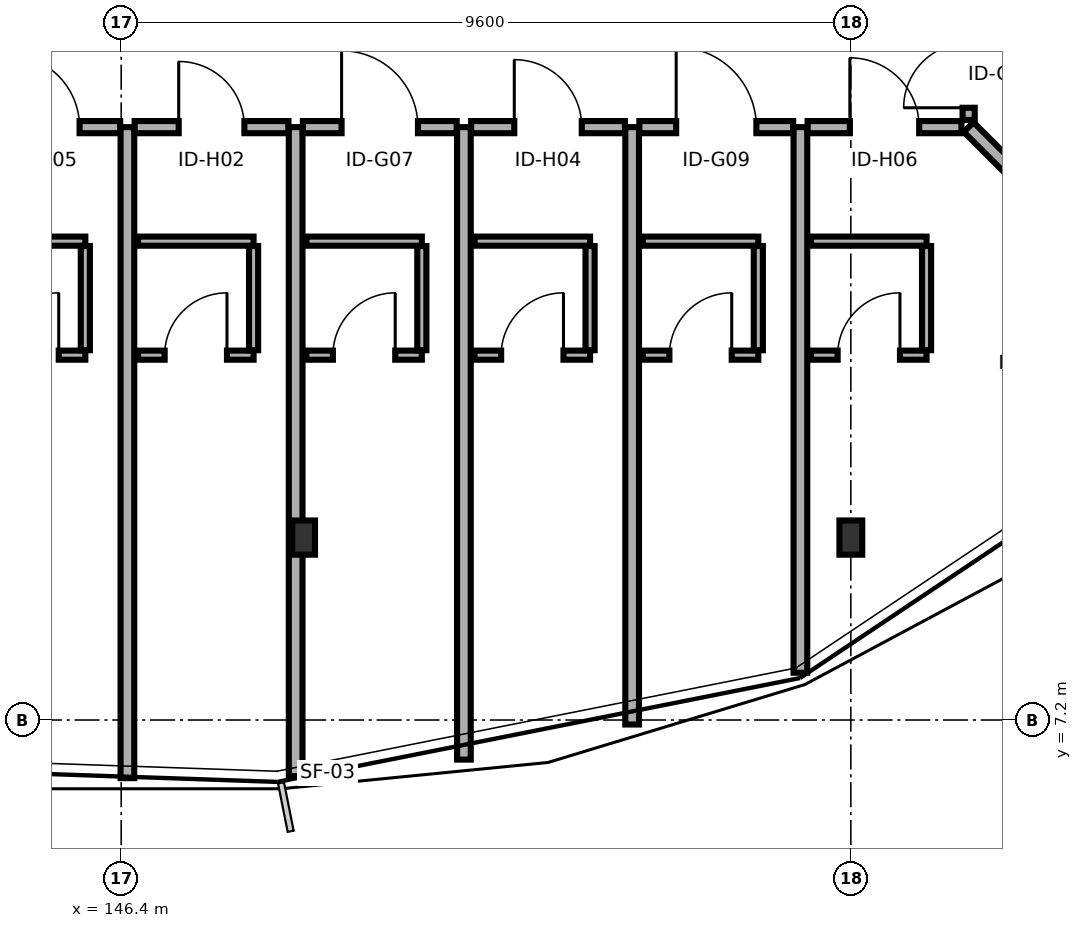
"""IFC4 building model, lengths in metres.
Left out: names, types, materials, properties, quantities, classifications, styles, units other than length and angle.
Written with IfcOpenShell. Run it as: python <this file> out.ifc"""

import sys

from ifc_helpers import new_model, si_unit, direction, frame, frame_2d, origin, origin_2d, place, context, subcontext, project, spatial, rectangle, i_section, extrude, element, fill, save


model = new_model("IFC4")
c1 = context("Model", 3, precision=1e-05, world=origin(), true_north=direction((0.0, 1.0)))
c2 = subcontext(c1, "Body", "Model", "MODEL_VIEW")
j1 = project(units=[si_unit("LENGTHUNIT", "METRE"), si_unit("PLANEANGLEUNIT", "RADIAN")], contexts=[c1])
p1 = place(None, origin())
s1 = spatial("IfcSite", under=j1, at=p1, CompositionType="ELEMENT")
p2 = place(p1, origin())
s2 = spatial("IfcBuilding", under=s1, at=p2, CompositionType="ELEMENT")
p3 = place(p2, frame((0.0, 0.0, 28.3)))
s3 = spatial("IfcBuildingStorey", under=s2, at=p3, CompositionType="ELEMENT", Elevation=28.3)
for number, where, z_axis, x_axis in (
    (1, (148.8, 9.6, 0.0), (0.0, 0.0, 1.0), (1.0, 0.0, 0.0)),
    (2, (156.0, 9.6, 0.0), (0.0, 0.0, 1.0), (1.0, 0.0, 0.0)),
):
    element("IfcColumn", number, at=place(p3, frame(where, z_axis=z_axis, x_axis=x_axis)), inside=s3, PredefinedType="COLUMN", context=c2, shape_type="SweptSolid", body=[
        extrude(i_section(OverallWidth=0.3, OverallDepth=0.45, WebThickness=0.014, FlangeThickness=0.026, FilletRadius=0.027, at=origin_2d()), origin(), (0.0, 0.0, 1.0), 3.4),
    ])
p4 = place(p3, frame((144.363, 15.0, 0.0), z_axis=(0.0, 0.0, 1.0), x_axis=(1.0, 0.0, 0.0)))
e3 = element("IfcWall", 3, at=p4, inside=s3, PredefinedType="PARTITIONING", context=c2, shape_type="SweptSolid", body=[
    extrude(rectangle(XDim=2.023, YDim=0.16, at=frame_2d((1.012, 0.0))), origin(), (0.0, 0.0, 1.0), 3.175),
])
p5 = place(p4, frame((0.534, 0.0, 0.0)))
e4 = element("IfcOpeningElement", 4, at=p5, cuts=e3, PredefinedType="OPENING", context=c2, shape_type="SweptSolid", body=[
    extrude(rectangle(XDim=0.955, YDim=2.05, at=frame_2d((0.478, 1.025))), frame((0.0, 0.09, 0.0), z_axis=(0.0, -1.0, 0.0), x_axis=(1.0, 0.0, 0.0)), (0.0, 0.0, 1.0), 0.18),
])
p6 = place(p3, frame((144.408, 12.0, 0.0), z_axis=(0.0, 0.0, 1.0), x_axis=(1.0, 0.0, 0.0)))
e5 = element("IfcWall", 5, at=p6, inside=s3, PredefinedType="PARTITIONING", context=c2, shape_type="SweptSolid", body=[
    extrude(rectangle(XDim=1.52, YDim=0.12, at=frame_2d((0.76, 0.0))), origin(), (0.0, 0.0, 1.0), 3.175),
])
p7 = place(p6, frame((0.35, 0.0, 0.0)))
e6 = element("IfcOpeningElement", 6, at=p7, cuts=e5, PredefinedType="OPENING", context=c2, shape_type="SweptSolid", body=[
    extrude(rectangle(XDim=0.82, YDim=2.08, at=frame_2d((0.41, 1.04))), frame((0.0, 0.07, 0.0), z_axis=(0.0, -1.0, 0.0), x_axis=(1.0, 0.0, 0.0)), (0.0, 0.0, 1.0), 0.14),
])
p8 = place(p3, frame((144.408, 13.5, 0.0), z_axis=(0.0, 0.0, 1.0), x_axis=(1.0, 0.0, 0.0)))
e7 = element("IfcWall", 7, at=p8, inside=s3, PredefinedType="PARTITIONING", context=c2, shape_type="SweptSolid", body=[
    extrude(rectangle(XDim=1.52, YDim=0.12, at=frame_2d((0.76, 0.0))), origin(), (0.0, 0.0, 1.0), 3.175),
])
p9 = place(p3, frame((145.928, 12.065, 0.0), z_axis=(0.0, 0.0, 1.0), x_axis=(0.0, 1.0, 0.0)))
e8 = element("IfcWall", 8, at=p9, inside=s3, PredefinedType="PARTITIONING", context=c2, shape_type="SweptSolid", body=[
    extrude(rectangle(XDim=1.37, YDim=0.12, at=frame_2d((0.685, 0.0))), origin(), (0.0, 0.0, 1.0), 3.175),
])
p10 = place(p3, frame((146.482, 6.436, 0.0), z_axis=(0.0, 0.0, 1.0), x_axis=(0.0, 1.0, 0.0)))
e9 = element("IfcWall", 9, at=p10, inside=s3, PredefinedType="PARTITIONING", context=c2, shape_type="SweptSolid", body=[
    extrude(rectangle(XDim=8.564, YDim=0.18, at=frame_2d((4.282, 0.0))), origin(), (0.0, 0.0, 1.0), 2.66),
])
p11 = place(p3, frame((146.577, 15.0, 0.0), z_axis=(0.0, 0.0, 1.0), x_axis=(1.0, 0.0, 0.0)))
e10 = element("IfcWall", 10, at=p11, inside=s3, PredefinedType="PARTITIONING", context=c2, shape_type="SweptSolid", body=[
    extrude(rectangle(XDim=2.024, YDim=0.16, at=frame_2d((1.012, 0.0))), origin(), (0.0, 0.0, 1.0), 3.175),
])
p12 = place(p11, frame((0.58, 0.0, 0.0)))
e11 = element("IfcOpeningElement", 11, at=p12, cuts=e10, PredefinedType="OPENING", context=c2, shape_type="SweptSolid", body=[
    extrude(rectangle(XDim=0.864, YDim=2.13, at=frame_2d((0.432, 1.065))), frame((0.0, 0.09, 0.0), z_axis=(0.0, -1.0, 0.0), x_axis=(1.0, 0.0, 0.0)), (0.0, 0.0, 1.0), 0.18),
])
p13 = place(p3, frame((146.622, 12.0, 0.0), z_axis=(0.0, 0.0, 1.0), x_axis=(1.0, 0.0, 0.0)))
e12 = element("IfcWall", 12, at=p13, inside=s3, PredefinedType="PARTITIONING", context=c2, shape_type="SweptSolid", body=[
    extrude(rectangle(XDim=1.52, YDim=0.12, at=frame_2d((0.76, 0.0))), origin(), (0.0, 0.0, 1.0), 3.175),
])
p14 = place(p13, frame((0.35, 0.0, 0.0)))
e13 = element("IfcOpeningElement", 13, at=p14, cuts=e12, PredefinedType="OPENING", context=c2, shape_type="SweptSolid", body=[
    extrude(rectangle(XDim=0.82, YDim=2.08, at=frame_2d((0.41, 1.04))), frame((0.0, 0.07, 0.0), z_axis=(0.0, -1.0, 0.0), x_axis=(1.0, 0.0, 0.0)), (0.0, 0.0, 1.0), 0.14),
])
p15 = place(p3, frame((146.622, 13.5, 0.0), z_axis=(0.0, 0.0, 1.0), x_axis=(1.0, 0.0, 0.0)))
e14 = element("IfcWall", 14, at=p15, inside=s3, PredefinedType="PARTITIONING", context=c2, shape_type="SweptSolid", body=[
    extrude(rectangle(XDim=1.52, YDim=0.12, at=frame_2d((0.76, 0.0))), origin(), (0.0, 0.0, 1.0), 3.175),
])
p16 = place(p3, frame((148.142, 12.065, 0.0), z_axis=(0.0, 0.0, 1.0), x_axis=(0.0, 1.0, 0.0)))
e15 = element("IfcWall", 15, at=p16, inside=s3, PredefinedType="PARTITIONING", context=c2, shape_type="SweptSolid", body=[
    extrude(rectangle(XDim=1.37, YDim=0.12, at=frame_2d((0.685, 0.0))), origin(), (0.0, 0.0, 1.0), 3.175),
])
p17 = place(p3, frame((148.696, 6.461, 0.0), z_axis=(0.0, 0.0, 1.0), x_axis=(0.0, 1.0, 0.0)))
e16 = element("IfcWall", 16, at=p17, inside=s3, PredefinedType="PARTITIONING", context=c2, shape_type="SweptSolid", body=[
    extrude(rectangle(XDim=8.539, YDim=0.18, at=frame_2d((4.27, 0.0))), origin(), (0.0, 0.0, 1.0), 2.66),
])
p18 = place(p3, frame((148.791, 15.0, 0.0), z_axis=(0.0, 0.0, 1.0), x_axis=(1.0, 0.0, 0.0)))
e17 = element("IfcWall", 17, at=p18, inside=s3, PredefinedType="PARTITIONING", context=c2, shape_type="SweptSolid", body=[
    extrude(rectangle(XDim=2.024, YDim=0.16, at=frame_2d((1.012, 0.0))), origin(), (0.0, 0.0, 1.0), 2.71),
])
p19 = place(p18, frame((0.509, 0.0, 0.0)))
e18 = element("IfcOpeningElement", 18, at=p19, cuts=e17, PredefinedType="OPENING", context=c2, shape_type="SweptSolid", body=[
    extrude(rectangle(XDim=1.005, YDim=2.05, at=frame_2d((0.502, 1.025))), frame((0.0, 0.09, 0.0), z_axis=(0.0, -1.0, 0.0), x_axis=(1.0, 0.0, 0.0)), (0.0, 0.0, 1.0), 0.18),
])
p20 = place(p3, frame((148.835, 12.0, 0.0), z_axis=(0.0, 0.0, 1.0), x_axis=(1.0, 0.0, 0.0)))
e19 = element("IfcWall", 19, at=p20, inside=s3, PredefinedType="PARTITIONING", context=c2, shape_type="SweptSolid", body=[
    extrude(rectangle(XDim=1.52, YDim=0.12, at=frame_2d((0.76, 0.0))), origin(), (0.0, 0.0, 1.0), 2.71),
])
p21 = place(p20, frame((0.35, 0.0, 0.0)))
e20 = element("IfcOpeningElement", 20, at=p21, cuts=e19, PredefinedType="OPENING", context=c2, shape_type="SweptSolid", body=[
    extrude(rectangle(XDim=0.82, YDim=2.08, at=frame_2d((0.41, 1.04))), frame((0.0, 0.07, 0.0), z_axis=(0.0, -1.0, 0.0), x_axis=(1.0, 0.0, 0.0)), (0.0, 0.0, 1.0), 0.14),
])
p22 = place(p3, frame((148.835, 13.5, 0.0), z_axis=(0.0, 0.0, 1.0), x_axis=(1.0, 0.0, 0.0)))
e21 = element("IfcWall", 21, at=p22, inside=s3, PredefinedType="PARTITIONING", context=c2, shape_type="SweptSolid", body=[
    extrude(rectangle(XDim=1.52, YDim=0.12, at=frame_2d((0.76, 0.0))), origin(), (0.0, 0.0, 1.0), 2.71),
])
p23 = place(p3, frame((150.355, 12.065, 0.0), z_axis=(0.0, 0.0, 1.0), x_axis=(0.0, 1.0, 0.0)))
e22 = element("IfcWall", 22, at=p23, inside=s3, PredefinedType="PARTITIONING", context=c2, shape_type="SweptSolid", body=[
    extrude(rectangle(XDim=1.37, YDim=0.12, at=frame_2d((0.685, 0.0))), origin(), (0.0, 0.0, 1.0), 3.175),
])
p24 = place(p3, frame((150.909, 6.679, 0.0), z_axis=(0.0, 0.0, 1.0), x_axis=(0.0, 1.0, 0.0)))
e23 = element("IfcWall", 23, at=p24, inside=s3, PredefinedType="PARTITIONING", context=c2, shape_type="SweptSolid", body=[
    extrude(rectangle(XDim=8.321, YDim=0.18, at=frame_2d((4.16, 0.0))), origin(), (0.0, 0.0, 1.0), 2.66),
])
p25 = place(p3, frame((151.004, 15.0, 0.0), z_axis=(0.0, 0.0, 1.0), x_axis=(1.0, 0.0, 0.0)))
e24 = element("IfcWall", 24, at=p25, inside=s3, PredefinedType="PARTITIONING", context=c2, shape_type="SweptSolid", body=[
    extrude(rectangle(XDim=2.023, YDim=0.16, at=frame_2d((1.012, 0.0))), origin(), (0.0, 0.0, 1.0), 3.175),
])
p26 = place(p25, frame((0.568, 0.0, 0.0)))
e25 = element("IfcOpeningElement", 25, at=p26, cuts=e24, PredefinedType="OPENING", context=c2, shape_type="SweptSolid", body=[
    extrude(rectangle(XDim=0.888, YDim=2.07, at=frame_2d((0.444, 1.035))), frame((0.0, 0.09, 0.0), z_axis=(0.0, -1.0, 0.0), x_axis=(1.0, 0.0, 0.0)), (0.0, 0.0, 1.0), 0.18),
])
p27 = place(p3, frame((151.049, 12.0, 0.0), z_axis=(0.0, 0.0, 1.0), x_axis=(1.0, 0.0, 0.0)))
e26 = element("IfcWall", 26, at=p27, inside=s3, PredefinedType="PARTITIONING", context=c2, shape_type="SweptSolid", body=[
    extrude(rectangle(XDim=1.52, YDim=0.12, at=frame_2d((0.76, 0.0))), origin(), (0.0, 0.0, 1.0), 3.175),
])
p28 = place(p27, frame((0.35, 0.0, 0.0)))
e27 = element("IfcOpeningElement", 27, at=p28, cuts=e26, PredefinedType="OPENING", context=c2, shape_type="SweptSolid", body=[
    extrude(rectangle(XDim=0.82, YDim=2.08, at=frame_2d((0.41, 1.04))), frame((0.0, 0.07, 0.0), z_axis=(0.0, -1.0, 0.0), x_axis=(1.0, 0.0, 0.0)), (0.0, 0.0, 1.0), 0.14),
])
p29 = place(p3, frame((151.049, 13.5, 0.0), z_axis=(0.0, 0.0, 1.0), x_axis=(1.0, 0.0, 0.0)))
e28 = element("IfcWall", 28, at=p29, inside=s3, PredefinedType="PARTITIONING", context=c2, shape_type="SweptSolid", body=[
    extrude(rectangle(XDim=1.52, YDim=0.12, at=frame_2d((0.76, 0.0))), origin(), (0.0, 0.0, 1.0), 3.175),
])
p30 = place(p3, frame((152.569, 12.065, 0.0), z_axis=(0.0, 0.0, 1.0), x_axis=(0.0, 1.0, 0.0)))
e29 = element("IfcWall", 29, at=p30, inside=s3, PredefinedType="PARTITIONING", context=c2, shape_type="SweptSolid", body=[
    extrude(rectangle(XDim=1.37, YDim=0.12, at=frame_2d((0.685, 0.0))), origin(), (0.0, 0.0, 1.0), 3.175),
])
p31 = place(p3, frame((153.123, 7.141, 0.0), z_axis=(0.0, 0.0, 1.0), x_axis=(0.0, 1.0, 0.0)))
e30 = element("IfcWall", 30, at=p31, inside=s3, PredefinedType="PARTITIONING", context=c2, shape_type="SweptSolid", body=[
    extrude(rectangle(XDim=7.859, YDim=0.18, at=frame_2d((3.929, 0.0))), origin(), (0.0, 0.0, 1.0), 2.66),
])
p32 = place(p3, frame((153.218, 15.0, 0.0), z_axis=(0.0, 0.0, 1.0), x_axis=(1.0, 0.0, 0.0)))
e31 = element("IfcWall", 31, at=p32, inside=s3, PredefinedType="PARTITIONING", context=c2, shape_type="SweptSolid", body=[
    extrude(rectangle(XDim=2.024, YDim=0.16, at=frame_2d((1.012, 0.0))), origin(), (0.0, 0.0, 1.0), 3.175),
])
p33 = place(p32, frame((0.484, 0.0, 0.0)))
e32 = element("IfcOpeningElement", 32, at=p33, cuts=e31, PredefinedType="OPENING", context=c2, shape_type="SweptSolid", body=[
    extrude(rectangle(XDim=1.055, YDim=2.05, at=frame_2d((0.527, 1.025))), frame((0.0, 0.09, 0.0), z_axis=(0.0, -1.0, 0.0), x_axis=(1.0, 0.0, 0.0)), (0.0, 0.0, 1.0), 0.18),
])
p34 = place(p3, frame((153.263, 12.0, 0.0), z_axis=(0.0, 0.0, 1.0), x_axis=(1.0, 0.0, 0.0)))
e33 = element("IfcWall", 33, at=p34, inside=s3, PredefinedType="PARTITIONING", context=c2, shape_type="SweptSolid", body=[
    extrude(rectangle(XDim=1.52, YDim=0.12, at=frame_2d((0.76, 0.0))), origin(), (0.0, 0.0, 1.0), 3.175),
])
p35 = place(p34, frame((0.35, 0.0, 0.0)))
e34 = element("IfcOpeningElement", 34, at=p35, cuts=e33, PredefinedType="OPENING", context=c2, shape_type="SweptSolid", body=[
    extrude(rectangle(XDim=0.82, YDim=2.08, at=frame_2d((0.41, 1.04))), frame((0.0, 0.07, 0.0), z_axis=(0.0, -1.0, 0.0), x_axis=(1.0, 0.0, 0.0)), (0.0, 0.0, 1.0), 0.14),
])
p36 = place(p3, frame((153.263, 13.5, 0.0), z_axis=(0.0, 0.0, 1.0), x_axis=(1.0, 0.0, 0.0)))
e35 = element("IfcWall", 35, at=p36, inside=s3, PredefinedType="PARTITIONING", context=c2, shape_type="SweptSolid", body=[
    extrude(rectangle(XDim=1.52, YDim=0.12, at=frame_2d((0.76, 0.0))), origin(), (0.0, 0.0, 1.0), 3.175),
])
p37 = place(p3, frame((154.783, 12.065, 0.0), z_axis=(0.0, 0.0, 1.0), x_axis=(0.0, 1.0, 0.0)))
e36 = element("IfcWall", 36, at=p37, inside=s3, PredefinedType="PARTITIONING", context=c2, shape_type="SweptSolid", body=[
    extrude(rectangle(XDim=1.37, YDim=0.12, at=frame_2d((0.685, 0.0))), origin(), (0.0, 0.0, 1.0), 3.175),
])
p38 = place(p3, frame((155.336, 7.822, 0.0), z_axis=(0.0, 0.0, 1.0), x_axis=(0.0, 1.0, 0.0)))
e37 = element("IfcWall", 37, at=p38, inside=s3, PredefinedType="PARTITIONING", context=c2, shape_type="SweptSolid", body=[
    extrude(rectangle(XDim=7.178, YDim=0.18, at=frame_2d((3.589, 0.0))), origin(), (0.0, 0.0, 1.0), 2.66),
])
p39 = place(p3, frame((155.431, 15.0, 0.0), z_axis=(0.0, 0.0, 1.0), x_axis=(1.0, 0.0, 0.0)))
e38 = element("IfcWall", 38, at=p39, inside=s3, PredefinedType="PARTITIONING", context=c2, shape_type="SweptSolid", body=[
    extrude(rectangle(XDim=2.024, YDim=0.16, at=frame_2d((1.012, 0.0))), origin(), (0.0, 0.0, 1.0), 2.71),
])
p40 = place(p39, frame((0.556, 0.0, 0.0)))
e39 = element("IfcOpeningElement", 39, at=p40, cuts=e38, PredefinedType="OPENING", context=c2, shape_type="SweptSolid", body=[
    extrude(rectangle(XDim=0.912, YDim=2.13, at=frame_2d((0.456, 1.065))), frame((0.0, 0.09, 0.0), z_axis=(0.0, -1.0, 0.0), x_axis=(1.0, 0.0, 0.0)), (0.0, 0.0, 1.0), 0.18),
])
p41 = place(p3, frame((155.476, 12.0, 0.0), z_axis=(0.0, 0.0, 1.0), x_axis=(1.0, 0.0, 0.0)))
e40 = element("IfcWall", 40, at=p41, inside=s3, PredefinedType="PARTITIONING", context=c2, shape_type="SweptSolid", body=[
    extrude(rectangle(XDim=1.52, YDim=0.12, at=frame_2d((0.76, 0.0))), origin(), (0.0, 0.0, 1.0), 2.71),
])
p42 = place(p41, frame((0.35, 0.0, 0.0)))
e41 = element("IfcOpeningElement", 41, at=p42, cuts=e40, PredefinedType="OPENING", context=c2, shape_type="SweptSolid", body=[
    extrude(rectangle(XDim=0.82, YDim=2.08, at=frame_2d((0.41, 1.04))), frame((0.0, 0.07, 0.0), z_axis=(0.0, -1.0, 0.0), x_axis=(1.0, 0.0, 0.0)), (0.0, 0.0, 1.0), 0.14),
])
p43 = place(p3, frame((155.476, 13.5, 0.0), z_axis=(0.0, 0.0, 1.0), x_axis=(1.0, 0.0, 0.0)))
e42 = element("IfcWall", 42, at=p43, inside=s3, PredefinedType="PARTITIONING", context=c2, shape_type="SweptSolid", body=[
    extrude(rectangle(XDim=1.52, YDim=0.12, at=frame_2d((0.76, 0.0))), origin(), (0.0, 0.0, 1.0), 2.71),
])
p44 = place(p3, frame((156.996, 12.065, 0.0), z_axis=(0.0, 0.0, 1.0), x_axis=(0.0, 1.0, 0.0)))
e43 = element("IfcWall", 43, at=p44, inside=s3, PredefinedType="PARTITIONING", context=c2, shape_type="SweptSolid", body=[
    extrude(rectangle(XDim=1.37, YDim=0.12, at=frame_2d((0.685, 0.0))), origin(), (0.0, 0.0, 1.0), 3.175),
])
p45 = place(p3, frame((157.55, 15.0, 0.0), z_axis=(0.0, 0.0, 1.0), x_axis=(0.707106781187, -0.707106781187, 0.0)))
e44 = element("IfcWall", 44, at=p45, inside=s3, PredefinedType="PARTITIONING", context=c2, shape_type="SweptSolid", body=[
    extrude(rectangle(XDim=4.844, YDim=0.18, at=frame_2d((2.422, 0.0))), origin(), (0.0, 0.0, 1.0), 2.66),
])
p46 = place(p3, frame((157.55, 15.095, 0.0), z_axis=(0.0, 0.0, 1.0), x_axis=(0.0, 1.0, 0.0)))
e45 = element("IfcWall", 45, at=p46, inside=s3, PredefinedType="PARTITIONING", context=c2, shape_type="SweptSolid", body=[
    extrude(rectangle(XDim=2.101, YDim=0.16, at=frame_2d((1.05, 0.0))), origin(), (0.0, 0.0, 1.0), 2.71),
])
p47 = place(p46, frame((0.16, 0.0, 0.0)))
e46 = element("IfcOpeningElement", 46, at=p47, cuts=e45, PredefinedType="OPENING", context=c2, shape_type="SweptSolid", body=[
    extrude(rectangle(XDim=0.855, YDim=2.05, at=frame_2d((0.427, 1.025))), frame((0.0, 0.09, 0.0), z_axis=(0.0, -1.0, 0.0), x_axis=(1.0, 0.0, 0.0)), (0.0, 0.0, 1.0), 0.18),
])
p48 = place(p5, origin())
e47 = element("IfcDoor", 47, at=p48, inside=s3, OperationType="SINGLE_SWING_LEFT", PredefinedType="DOOR", context=c2, shape_type="SweptSolid", body=[
    extrude(rectangle(XDim=0.955, YDim=2.05, at=frame_2d((0.478, 1.025))), frame((0.0, 0.025, 0.0), z_axis=(0.0, -1.0, 0.0), x_axis=(1.0, 0.0, 0.0)), (0.0, 0.0, 1.0), 0.05),
])
fill(e4, e47)
p49 = place(p7, origin())
e48 = element("IfcDoor", 48, at=p49, inside=s3, OperationType="SINGLE_SWING_RIGHT", PredefinedType="DOOR", context=c2, shape_type="SweptSolid", body=[
    extrude(rectangle(XDim=0.82, YDim=2.08, at=frame_2d((0.41, 1.04))), frame((0.0, 0.025, 0.0), z_axis=(0.0, -1.0, 0.0), x_axis=(1.0, 0.0, 0.0)), (0.0, 0.0, 1.0), 0.05),
])
fill(e6, e48)
p50 = place(p12, origin())
e49 = element("IfcDoor", 49, at=p50, inside=s3, OperationType="SINGLE_SWING_LEFT", PredefinedType="DOOR", context=c2, shape_type="SweptSolid", body=[
    extrude(rectangle(XDim=0.864, YDim=2.13, at=frame_2d((0.432, 1.065))), frame((0.0, 0.025, 0.0), z_axis=(0.0, -1.0, 0.0), x_axis=(1.0, 0.0, 0.0)), (0.0, 0.0, 1.0), 0.05),
])
fill(e11, e49)
p51 = place(p14, origin())
e50 = element("IfcDoor", 50, at=p51, inside=s3, OperationType="SINGLE_SWING_RIGHT", PredefinedType="DOOR", context=c2, shape_type="SweptSolid", body=[
    extrude(rectangle(XDim=0.82, YDim=2.08, at=frame_2d((0.41, 1.04))), frame((0.0, 0.025, 0.0), z_axis=(0.0, -1.0, 0.0), x_axis=(1.0, 0.0, 0.0)), (0.0, 0.0, 1.0), 0.05),
])
fill(e13, e50)
p52 = place(p19, origin())
e51 = element("IfcDoor", 51, at=p52, inside=s3, OperationType="SINGLE_SWING_LEFT", PredefinedType="DOOR", context=c2, shape_type="SweptSolid", body=[
    extrude(rectangle(XDim=1.005, YDim=2.05, at=frame_2d((0.502, 1.025))), frame((0.0, 0.025, 0.0), z_axis=(0.0, -1.0, 0.0), x_axis=(1.0, 0.0, 0.0)), (0.0, 0.0, 1.0), 0.05),
])
fill(e18, e51)
p53 = place(p21, origin())
e52 = element("IfcDoor", 52, at=p53, inside=s3, OperationType="SINGLE_SWING_RIGHT", PredefinedType="DOOR", context=c2, shape_type="SweptSolid", body=[
    extrude(rectangle(XDim=0.82, YDim=2.08, at=frame_2d((0.41, 1.04))), frame((0.0, 0.025, 0.0), z_axis=(0.0, -1.0, 0.0), x_axis=(1.0, 0.0, 0.0)), (0.0, 0.0, 1.0), 0.05),
])
fill(e20, e52)
p54 = place(p26, origin())
e53 = element("IfcDoor", 53, at=p54, inside=s3, OperationType="SINGLE_SWING_LEFT", PredefinedType="DOOR", context=c2, shape_type="SweptSolid", body=[
    extrude(rectangle(XDim=0.888, YDim=2.07, at=frame_2d((0.444, 1.035))), frame((0.0, 0.025, 0.0), z_axis=(0.0, -1.0, 0.0), x_axis=(1.0, 0.0, 0.0)), (0.0, 0.0, 1.0), 0.05),
])
fill(e25, e53)
p55 = place(p28, origin())
e54 = element("IfcDoor", 54, at=p55, inside=s3, OperationType="SINGLE_SWING_RIGHT", PredefinedType="DOOR", context=c2, shape_type="SweptSolid", body=[
    extrude(rectangle(XDim=0.82, YDim=2.08, at=frame_2d((0.41, 1.04))), frame((0.0, 0.025, 0.0), z_axis=(0.0, -1.0, 0.0), x_axis=(1.0, 0.0, 0.0)), (0.0, 0.0, 1.0), 0.05),
])
fill(e27, e54)
p56 = place(p33, origin())
e55 = element("IfcDoor", 55, at=p56, inside=s3, OperationType="SINGLE_SWING_LEFT", PredefinedType="DOOR", context=c2, shape_type="SweptSolid", body=[
    extrude(rectangle(XDim=1.055, YDim=2.05, at=frame_2d((0.527, 1.025))), frame((0.0, 0.025, 0.0), z_axis=(0.0, -1.0, 0.0), x_axis=(1.0, 0.0, 0.0)), (0.0, 0.0, 1.0), 0.05),
])
fill(e32, e55)
p57 = place(p35, origin())
e56 = element("IfcDoor", 56, at=p57, inside=s3, OperationType="SINGLE_SWING_RIGHT", PredefinedType="DOOR", context=c2, shape_type="SweptSolid", body=[
    extrude(rectangle(XDim=0.82, YDim=2.08, at=frame_2d((0.41, 1.04))), frame((0.0, 0.025, 0.0), z_axis=(0.0, -1.0, 0.0), x_axis=(1.0, 0.0, 0.0)), (0.0, 0.0, 1.0), 0.05),
])
fill(e34, e56)
p58 = place(p40, origin())
e57 = element("IfcDoor", 57, at=p58, inside=s3, OperationType="SINGLE_SWING_LEFT", PredefinedType="DOOR", context=c2, shape_type="SweptSolid", body=[
    extrude(rectangle(XDim=0.912, YDim=2.13, at=frame_2d((0.456, 1.065))), frame((0.0, 0.025, 0.0), z_axis=(0.0, -1.0, 0.0), x_axis=(1.0, 0.0, 0.0)), (0.0, 0.0, 1.0), 0.05),
])
fill(e39, e57)
p59 = place(p42, origin())
e58 = element("IfcDoor", 58, at=p59, inside=s3, OperationType="SINGLE_SWING_RIGHT", PredefinedType="DOOR", context=c2, shape_type="SweptSolid", body=[
    extrude(rectangle(XDim=0.82, YDim=2.08, at=frame_2d((0.41, 1.04))), frame((0.0, 0.025, 0.0), z_axis=(0.0, -1.0, 0.0), x_axis=(1.0, 0.0, 0.0)), (0.0, 0.0, 1.0), 0.05),
])
fill(e41, e58)
p60 = place(p47, origin())
e59 = element("IfcDoor", 59, at=p60, inside=s3, OperationType="SINGLE_SWING_LEFT", PredefinedType="DOOR", context=c2, shape_type="SweptSolid", body=[
    extrude(rectangle(XDim=0.855, YDim=2.05, at=frame_2d((0.427, 1.025))), frame((0.0, 0.025, 0.0), z_axis=(0.0, -1.0, 0.0), x_axis=(1.0, 0.0, 0.0)), (0.0, 0.0, 1.0), 0.05),
])
fill(e46, e59)
save(model, sys.argv[1])
